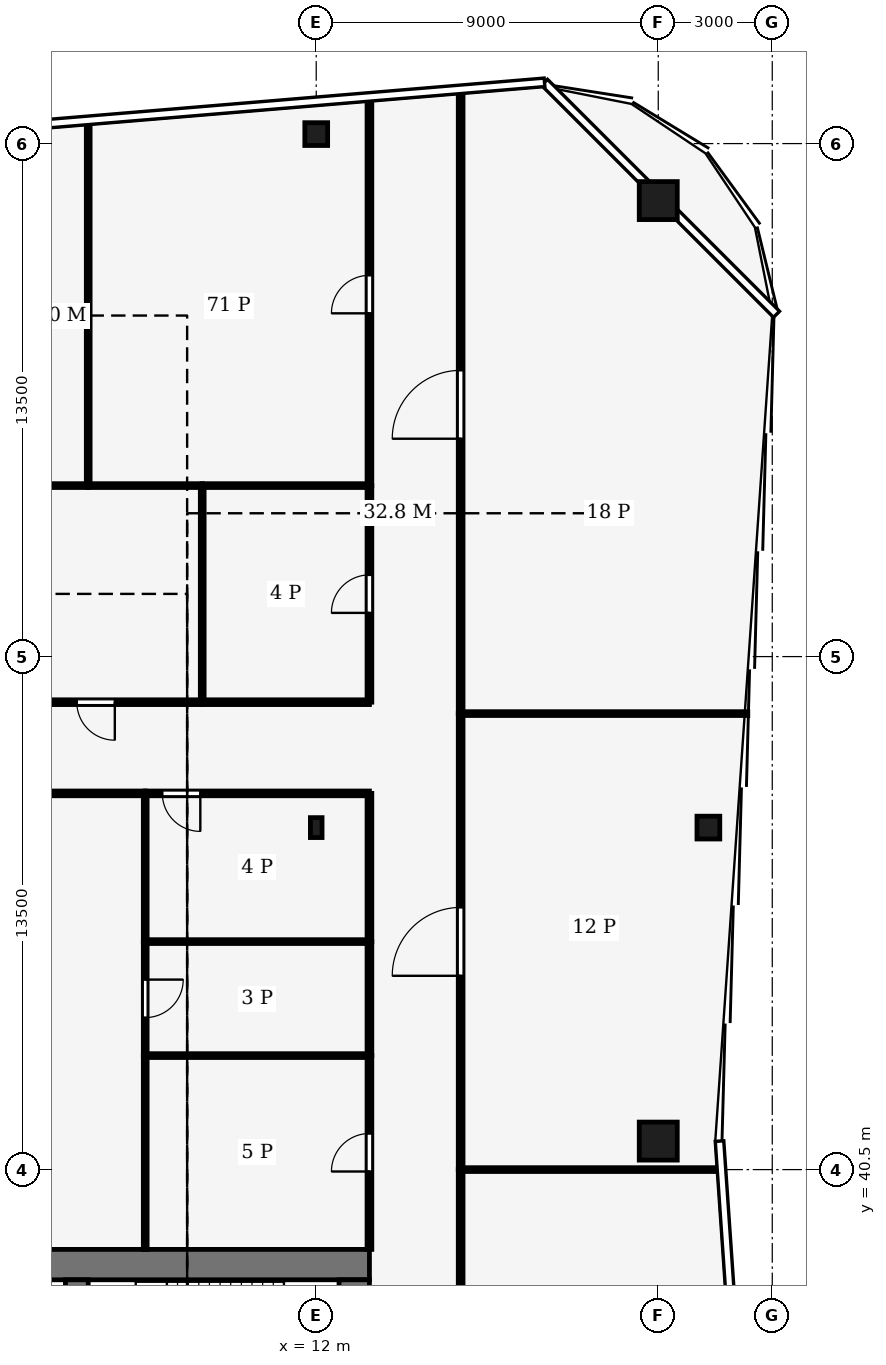
"""IFC4 building model, lengths in metres.
Left out: names, types, materials, properties, quantities, classifications, styles, units other than length and angle.
Written with IfcOpenShell. Run it as: python <this file> out.ifc"""

import sys

from ifc_helpers import new_model, si_unit, direction, frame, frame_2d, origin, origin_2d, place, context, subcontext, project, spatial, rectangle, hollow_rectangle, i_section, extrude, element, fill, save


model = new_model("IFC4")
c1 = context("Model", 3, precision=1e-05, world=origin(), true_north=direction((0.0, 1.0)))
c2 = subcontext(c1, "Body", "Model", "MODEL_VIEW")
j1 = project(units=[si_unit("LENGTHUNIT", "METRE"), si_unit("PLANEANGLEUNIT", "RADIAN")], contexts=[c1])
p1 = place(None, origin())
s1 = spatial("IfcSite", under=j1, at=p1, CompositionType="ELEMENT")
p2 = place(p1, origin())
s2 = spatial("IfcBuilding", under=s1, at=p2, CompositionType="ELEMENT")
p3 = place(p2, frame((0.0, 0.0, 258.0)))
s3 = spatial("IfcBuildingStorey", under=s2, at=p3, CompositionType="ELEMENT", Elevation=258.0)
p4 = place(p3, frame((-13.4, 38.0, -0.13), z_axis=(0.0, 0.0, 1.0), x_axis=(1.0, 0.0, 0.0)))
e1 = element("IfcWall", 1, at=p4, inside=s3, PredefinedType="SHEAR", context=c2, shape_type="SweptSolid", body=[
    extrude(rectangle(XDim=26.8, YDim=0.8, at=frame_2d((13.4, 0.0))), origin(), (0.0, 0.0, 1.0), 4.0),
])
p5 = place(p3, frame((13.0, 18.4, -0.13), z_axis=(0.0, 0.0, 1.0), x_axis=(0.0, 1.0, 0.0)))
e2 = element("IfcWall", 2, at=p5, inside=s3, PredefinedType="SHEAR", context=c2, shape_type="SweptSolid", body=[
    extrude(rectangle(XDim=19.2, YDim=0.8, at=frame_2d((9.6, 0.0))), origin(), (0.0, 0.0, 1.0), 4.0),
])
p6 = place(p5, frame((2.8, 0.0, 0.13)))
e3 = element("IfcOpeningElement", 3, at=p6, cuts=e2, PredefinedType="OPENING", context=c2, shape_type="SweptSolid", body=[
    extrude(rectangle(XDim=2.4, YDim=2.4, at=frame_2d((1.2, 1.2))), frame((0.0, 0.41, 0.0), z_axis=(0.0, -1.0, 0.0), x_axis=(1.0, 0.0, 0.0)), (0.0, 0.0, 1.0), 0.82),
])
p7 = place(p5, frame((13.3, 0.0, 0.13)))
e4 = element("IfcOpeningElement", 4, at=p7, cuts=e2, PredefinedType="OPENING", context=c2, shape_type="SweptSolid", body=[
    extrude(rectangle(XDim=2.4, YDim=2.4, at=frame_2d((1.2, 1.2))), frame((0.0, 0.41, 0.0), z_axis=(0.0, -1.0, 0.0), x_axis=(1.0, 0.0, 0.0)), (0.0, 0.0, 1.0), 0.82),
])
p8 = place(p3, frame((5.7, 18.4, -0.13), z_axis=(0.0, 0.0, 1.0), x_axis=(0.0, 1.0, 0.0)))
e5 = element("IfcWall", 5, at=p8, inside=s3, PredefinedType="SHEAR", context=c2, shape_type="SweptSolid", body=[
    extrude(rectangle(XDim=19.2, YDim=0.6, at=frame_2d((9.6, 0.0))), origin(), (0.0, 0.0, 1.0), 4.0),
])
p9 = place(p8, frame((8.35, 0.0, 0.13)))
e6 = element("IfcOpeningElement", 6, at=p9, cuts=e5, PredefinedType="OPENING", context=c2, shape_type="SweptSolid", body=[
    extrude(rectangle(XDim=0.9, YDim=2.1, at=frame_2d((0.45, 1.05))), frame((0.0, 0.31, 0.0), z_axis=(0.0, -1.0, 0.0), x_axis=(1.0, 0.0, 0.0)), (0.0, 0.0, 1.0), 0.62),
])
p10 = place(p8, frame((13.3, 0.0, 0.13)))
e7 = element("IfcOpeningElement", 7, at=p10, cuts=e5, PredefinedType="OPENING", context=c2, shape_type="SweptSolid", body=[
    extrude(rectangle(XDim=2.4, YDim=2.4, at=frame_2d((1.2, 1.2))), frame((0.0, 0.31, 0.0), z_axis=(0.0, -1.0, 0.0), x_axis=(1.0, 0.0, 0.0)), (0.0, 0.0, 1.0), 0.62),
])
for number, where, z_axis, x_axis in (
    (8, (21.0, 66.0, 0.0), (0.0, 0.0, 1.0), (1.0, 0.0, 0.0)),
    (9, (21.0, 41.25, 0.0), (0.0, 0.0, 1.0), (1.0, 0.0, 0.0)),
):
    element("IfcColumn", number, at=place(p3, frame(where, z_axis=z_axis, x_axis=x_axis)), inside=s3, PredefinedType="COLUMN", context=c2, shape_type="SweptSolid", body=[
        extrude(hollow_rectangle(XDim=1.0, YDim=1.0, WallThickness=0.045, at=origin_2d()), origin(), (0.0, 0.0, 1.0), 4.0),
    ])
for number, where, z_axis, x_axis in (
    (10, (12.0, 67.75, 0.0), (0.0, 0.0, 1.0), (1.0, 0.0, 0.0)),
    (11, (22.319, 49.5, 0.0), (0.0, 0.0, 1.0), (1.0, 0.0, 0.0)),
):
    element("IfcColumn", number, at=place(p3, frame(where, z_axis=z_axis, x_axis=x_axis)), inside=s3, PredefinedType="COLUMN", context=c2, shape_type="SweptSolid", body=[
        extrude(hollow_rectangle(XDim=0.6, YDim=0.6, WallThickness=0.025, at=origin_2d()), origin(), (0.0, 0.0, 1.0), 4.0),
    ])
p11 = place(p3, frame((12.0, 49.5, 0.0), z_axis=(0.0, 0.0, 1.0), x_axis=(1.0, 0.0, 0.0)))
e12 = element("IfcColumn", 12, at=p11, inside=s3, PredefinedType="COLUMN", context=c2, shape_type="SweptSolid", body=[
    extrude(i_section(OverallWidth=0.306, OverallDepth=0.524, WebThickness=0.012, FlangeThickness=0.04, FilletRadius=0.027, at=origin_2d()), origin(), (0.0, 0.0, 1.0), 4.0),
])
p12 = place(p3, frame((15.8, 40.5, 0.0), z_axis=(0.0, 0.0, 1.0), x_axis=(0.0, -1.0, 0.0)))
e13 = element("IfcWall", 13, at=p12, inside=s3, PredefinedType="PARTITIONING", context=c2, shape_type="SweptSolid", body=[
    extrude(rectangle(XDim=12.0, YDim=0.125, at=frame_2d((6.0, 0.0))), origin(), (0.0, 0.0, 1.0), 3.14),
])
p13 = place(p12, frame((5.5, 0.0, 0.0)))
e14 = element("IfcOpeningElement", 14, at=p13, cuts=e13, PredefinedType="OPENING", context=c2, shape_type="SweptSolid", body=[
    extrude(rectangle(XDim=1.0, YDim=2.1, at=frame_2d((0.5, 1.05))), frame((0.0, 0.073, 0.0), z_axis=(0.0, -1.0, 0.0), x_axis=(1.0, 0.0, 0.0)), (0.0, 0.0, 1.0), 0.145),
])
p14 = place(p3, frame((15.8, 40.5, 0.0), z_axis=(0.0, 0.0, 1.0), x_axis=(0.0, 1.0, 0.0)))
e15 = element("IfcWall", 15, at=p14, inside=s3, PredefinedType="PARTITIONING", context=c2, shape_type="SweptSolid", body=[
    extrude(rectangle(XDim=12.0, YDim=0.125, at=frame_2d((6.0, 0.0))), origin(), (0.0, 0.0, 1.0), 3.24),
])
p15 = place(p14, frame((5.1, 0.0, 0.0)))
e16 = element("IfcOpeningElement", 16, at=p15, cuts=e15, PredefinedType="OPENING", context=c2, shape_type="SweptSolid", body=[
    extrude(rectangle(XDim=1.8, YDim=2.1, at=frame_2d((0.9, 1.05))), frame((0.0, 0.073, 0.0), z_axis=(0.0, -1.0, 0.0), x_axis=(1.0, 0.0, 0.0)), (0.0, 0.0, 1.0), 0.145),
])
p16 = place(p3, frame((15.8, 52.5, 0.0), z_axis=(0.0, 0.0, 1.0), x_axis=(0.0, 1.0, 0.0)))
e17 = element("IfcWall", 17, at=p16, inside=s3, PredefinedType="PARTITIONING", context=c2, shape_type="SweptSolid", body=[
    extrude(rectangle(XDim=16.397, YDim=0.125, at=frame_2d((8.198, 0.0))), origin(), (0.0, 0.0, 1.0), 3.04),
])
p17 = place(p16, frame((7.233, 0.0, 0.0)))
e18 = element("IfcOpeningElement", 18, at=p17, cuts=e17, PredefinedType="OPENING", context=c2, shape_type="SweptSolid", body=[
    extrude(rectangle(XDim=1.8, YDim=2.1, at=frame_2d((0.9, 1.05))), frame((0.0, 0.073, 0.0), z_axis=(0.0, -1.0, 0.0), x_axis=(1.0, 0.0, 0.0)), (0.0, 0.0, 1.0), 0.145),
])
p18 = place(p3, frame((13.4, 38.4, 0.0), z_axis=(0.0, 0.0, 1.0), x_axis=(0.0, 1.0, 0.0)))
e19 = element("IfcWall", 19, at=p18, inside=s3, PredefinedType="PARTITIONING", context=c2, shape_type="SweptSolid", body=[
    extrude(rectangle(XDim=5.1, YDim=0.125, at=frame_2d((2.55, 0.0))), origin(), (0.0, 0.0, 1.0), 3.14),
])
p19 = place(p18, frame((2.05, 0.0, 0.0)))
e20 = element("IfcOpeningElement", 20, at=p19, cuts=e19, PredefinedType="OPENING", context=c2, shape_type="SweptSolid", body=[
    extrude(rectangle(XDim=1.0, YDim=2.1, at=frame_2d((0.5, 1.05))), frame((0.0, 0.073, 0.0), z_axis=(0.0, -1.0, 0.0), x_axis=(1.0, 0.0, 0.0)), (0.0, 0.0, 1.0), 0.145),
])
p20 = place(p3, frame((13.4, 43.5, 0.0), z_axis=(0.0, 0.0, 1.0), x_axis=(0.0, 1.0, 0.0)))
e21 = element("IfcWall", 21, at=p20, inside=s3, PredefinedType="PARTITIONING", context=c2, shape_type="SweptSolid", body=[
    extrude(rectangle(XDim=3.0, YDim=0.125, at=frame_2d((1.5, 0.0))), origin(), (0.0, 0.0, 1.0), 3.87),
])
p21 = place(p3, frame((13.4, 50.4, 0.0), z_axis=(0.0, 0.0, 1.0), x_axis=(-1.0, 0.0, 0.0)))
e22 = element("IfcWall", 22, at=p21, inside=s3, PredefinedType="PARTITIONING", context=c2, shape_type="SweptSolid", body=[
    extrude(rectangle(XDim=5.9, YDim=0.125, at=frame_2d((2.95, 0.0))), origin(), (0.0, 0.0, 1.0), 3.24),
])
p22 = place(p21, frame((4.45, 0.0, 0.0)))
e23 = element("IfcOpeningElement", 23, at=p22, cuts=e22, PredefinedType="OPENING", context=c2, shape_type="SweptSolid", body=[
    extrude(rectangle(XDim=1.0, YDim=2.1, at=frame_2d((0.5, 1.05))), frame((0.0, 0.073, 0.0), z_axis=(0.0, -1.0, 0.0), x_axis=(1.0, 0.0, 0.0)), (0.0, 0.0, 1.0), 0.145),
])
p23 = place(p3, frame((13.4, 46.5, 0.0), z_axis=(0.0, 0.0, 1.0), x_axis=(0.0, 1.0, 0.0)))
e24 = element("IfcWall", 24, at=p23, inside=s3, PredefinedType="PARTITIONING", context=c2, shape_type="SweptSolid", body=[
    extrude(rectangle(XDim=3.9, YDim=0.125, at=frame_2d((1.95, 0.0))), origin(), (0.0, 0.0, 1.0), 3.24),
])
p24 = place(p3, frame((7.5, 50.4, 0.0), z_axis=(0.0, 0.0, 1.0), x_axis=(-1.0, 0.0, 0.0)))
e25 = element("IfcWall", 25, at=p24, inside=s3, PredefinedType="PARTITIONING", context=c2, shape_type="SweptSolid", body=[
    extrude(rectangle(XDim=7.5, YDim=0.125, at=frame_2d((3.75, 0.0))), origin(), (0.0, 0.0, 1.0), 3.24),
])
p25 = place(p24, frame((2.85, 0.0, 0.0)))
e26 = element("IfcOpeningElement", 26, at=p25, cuts=e25, PredefinedType="OPENING", context=c2, shape_type="SweptSolid", body=[
    extrude(rectangle(XDim=1.0, YDim=2.1, at=frame_2d((0.5, 1.05))), frame((0.0, 0.073, 0.0), z_axis=(0.0, -1.0, 0.0), x_axis=(1.0, 0.0, 0.0)), (0.0, 0.0, 1.0), 0.145),
])
p26 = place(p3, frame((9.0, 52.8, 0.0), z_axis=(0.0, 0.0, 1.0), x_axis=(-1.0, 0.0, 0.0)))
e27 = element("IfcWall", 27, at=p26, inside=s3, PredefinedType="PARTITIONING", context=c2, shape_type="SweptSolid", body=[
    extrude(rectangle(XDim=12.0, YDim=0.125, at=frame_2d((6.0, 0.0))), origin(), (0.0, 0.0, 1.0), 3.24),
])
p27 = place(p26, frame((2.3, 0.0, 0.0)))
e28 = element("IfcOpeningElement", 28, at=p27, cuts=e27, PredefinedType="OPENING", context=c2, shape_type="SweptSolid", body=[
    extrude(rectangle(XDim=1.0, YDim=2.1, at=frame_2d((0.5, 1.05))), frame((0.0, 0.073, 0.0), z_axis=(0.0, -1.0, 0.0), x_axis=(1.0, 0.0, 0.0)), (0.0, 0.0, 1.0), 0.145),
])
p28 = place(p3, frame((13.4, 52.8, 0.0), z_axis=(0.0, 0.0, 1.0), x_axis=(0.0, 1.0, 0.0)))
e29 = element("IfcWall", 29, at=p28, inside=s3, PredefinedType="PARTITIONING", context=c2, shape_type="SweptSolid", body=[
    extrude(rectangle(XDim=5.7, YDim=0.125, at=frame_2d((2.85, 0.0))), origin(), (0.0, 0.0, 1.0), 3.87),
])
p29 = place(p28, frame((2.35, 0.0, 0.0)))
e30 = element("IfcOpeningElement", 30, at=p29, cuts=e29, PredefinedType="OPENING", context=c2, shape_type="SweptSolid", body=[
    extrude(rectangle(XDim=1.0, YDim=2.1, at=frame_2d((0.5, 1.05))), frame((0.0, 0.073, 0.0), z_axis=(0.0, -1.0, 0.0), x_axis=(1.0, 0.0, 0.0)), (0.0, 0.0, 1.0), 0.145),
])
p30 = place(p3, frame((13.4, 52.8, 0.0), z_axis=(0.0, 0.0, 1.0), x_axis=(-1.0, 0.0, 0.0)))
e31 = element("IfcWall", 31, at=p30, inside=s3, PredefinedType="PARTITIONING", context=c2, shape_type="SweptSolid", body=[
    extrude(rectangle(XDim=4.4, YDim=0.125, at=frame_2d((2.2, 0.0))), origin(), (0.0, 0.0, 1.0), 3.24),
])
p31 = place(p3, frame((13.4, 58.5, 0.0), z_axis=(0.0, 0.0, 1.0), x_axis=(0.0, 1.0, 0.0)))
e32 = element("IfcWall", 32, at=p31, inside=s3, PredefinedType="PARTITIONING", context=c2, shape_type="SweptSolid", body=[
    extrude(rectangle(XDim=10.197, YDim=0.125, at=frame_2d((5.098, 0.0))), origin(), (0.0, 0.0, 1.0), 3.04),
])
p32 = place(p31, frame((4.533, 0.0, 0.0)))
e33 = element("IfcOpeningElement", 33, at=p32, cuts=e32, PredefinedType="OPENING", context=c2, shape_type="SweptSolid", body=[
    extrude(rectangle(XDim=1.0, YDim=2.1, at=frame_2d((0.5, 1.05))), frame((0.0, 0.073, 0.0), z_axis=(0.0, -1.0, 0.0), x_axis=(1.0, 0.0, 0.0)), (0.0, 0.0, 1.0), 0.145),
])
p33 = place(p3, frame((22.632, 40.5, 0.0), z_axis=(0.0, 0.0, 1.0), x_axis=(-1.0, 0.0, 0.0)))
e34 = element("IfcWall", 34, at=p33, inside=s3, PredefinedType="PARTITIONING", context=c2, shape_type="SweptSolid", body=[
    extrude(rectangle(XDim=6.832, YDim=0.1, at=frame_2d((3.416, 0.0))), origin(), (0.0, 0.0, 1.0), 3.04),
])
p34 = place(p3, frame((23.356, 52.5, 0.0), z_axis=(0.0, 0.0, 1.0), x_axis=(-1.0, 0.0, 0.0)))
e35 = element("IfcWall", 35, at=p34, inside=s3, PredefinedType="PARTITIONING", context=c2, shape_type="SweptSolid", body=[
    extrude(rectangle(XDim=7.556, YDim=0.1, at=frame_2d((3.778, 0.0))), origin(), (0.0, 0.0, 1.0), 3.04),
])
p35 = place(p3, frame((13.4, 43.5, 0.0), z_axis=(0.0, 0.0, 1.0), x_axis=(-1.0, 0.0, 0.0)))
e36 = element("IfcWall", 36, at=p35, inside=s3, PredefinedType="PARTITIONING", context=c2, shape_type="SweptSolid", body=[
    extrude(rectangle(XDim=5.9, YDim=0.1, at=frame_2d((2.95, 0.0))), origin(), (0.0, 0.0, 1.0), 3.44),
])
p36 = place(p3, frame((7.5, 43.504, 0.0), z_axis=(0.0, 0.0, 1.0), x_axis=(0.0, -1.0, 0.0)))
e37 = element("IfcWall", 37, at=p36, inside=s3, PredefinedType="PARTITIONING", context=c2, shape_type="SweptSolid", body=[
    extrude(rectangle(XDim=5.104, YDim=0.1, at=frame_2d((2.552, 0.0))), origin(), (0.0, 0.0, 1.0), 3.87),
])
p37 = place(p3, frame((13.4, 46.5, 0.0), z_axis=(0.0, 0.0, 1.0), x_axis=(-1.0, 0.0, 0.0)))
e38 = element("IfcWall", 38, at=p37, inside=s3, PredefinedType="PARTITIONING", context=c2, shape_type="SweptSolid", body=[
    extrude(rectangle(XDim=5.9, YDim=0.1, at=frame_2d((2.95, 0.0))), origin(), (0.0, 0.0, 1.0), 3.44),
])
p38 = place(p3, frame((7.5, 46.504, 0.0), z_axis=(0.0, 0.0, 1.0), x_axis=(0.0, -1.0, 0.0)))
e39 = element("IfcWall", 39, at=p38, inside=s3, PredefinedType="PARTITIONING", context=c2, shape_type="SweptSolid", body=[
    extrude(rectangle(XDim=3.008, YDim=0.1, at=frame_2d((1.504, 0.0))), origin(), (0.0, 0.0, 1.0), 3.87),
])
p39 = place(p38, frame((1.004, 0.0, 0.0)))
e40 = element("IfcOpeningElement", 40, at=p39, cuts=e39, PredefinedType="OPENING", context=c2, shape_type="SweptSolid", body=[
    extrude(rectangle(XDim=1.0, YDim=2.1, at=frame_2d((0.5, 1.05))), frame((0.0, 0.06, 0.0), z_axis=(0.0, -1.0, 0.0), x_axis=(1.0, 0.0, 0.0)), (0.0, 0.0, 1.0), 0.12),
])
p40 = place(p3, frame((7.5, 50.4, 0.0), z_axis=(0.0, 0.0, 1.0), x_axis=(0.0, -1.0, 0.0)))
e41 = element("IfcWall", 41, at=p40, inside=s3, PredefinedType="PARTITIONING", context=c2, shape_type="SweptSolid", body=[
    extrude(rectangle(XDim=3.904, YDim=0.1, at=frame_2d((1.952, 0.0))), origin(), (0.0, 0.0, 1.0), 3.24),
])
p41 = place(p3, frame((9.0, 52.8, 0.0), z_axis=(0.0, 0.0, 1.0), x_axis=(0.0, 1.0, 0.0)))
e42 = element("IfcWall", 42, at=p41, inside=s3, PredefinedType="PARTITIONING", context=c2, shape_type="SweptSolid", body=[
    extrude(rectangle(XDim=5.7, YDim=0.1, at=frame_2d((2.85, 0.0))), origin(), (0.0, 0.0, 1.0), 3.87),
])
p42 = place(p3, frame((-3.0, 58.5, 0.0), z_axis=(0.0, 0.0, 1.0), x_axis=(1.0, 0.0, 0.0)))
e43 = element("IfcWall", 43, at=p42, inside=s3, PredefinedType="PARTITIONING", context=c2, shape_type="SweptSolid", body=[
    extrude(rectangle(XDim=9.0, YDim=0.1, at=frame_2d((4.5, 0.0))), origin(), (0.0, 0.0, 1.0), 3.24),
])
p43 = place(p42, frame((4.0, 0.0, 0.0)))
e44 = element("IfcOpeningElement", 44, at=p43, cuts=e43, PredefinedType="OPENING", context=c2, shape_type="SweptSolid", body=[
    extrude(rectangle(XDim=1.0, YDim=2.1, at=frame_2d((0.5, 1.05))), frame((0.0, 0.06, 0.0), z_axis=(0.0, -1.0, 0.0), x_axis=(1.0, 0.0, 0.0)), (0.0, 0.0, 1.0), 0.12),
])
p44 = place(p3, frame((9.004, 58.5, 0.0), z_axis=(0.0, 0.0, 1.0), x_axis=(-1.0, 0.0, 0.0)))
e45 = element("IfcWall", 45, at=p44, inside=s3, PredefinedType="PARTITIONING", context=c2, shape_type="SweptSolid", body=[
    extrude(rectangle(XDim=3.004, YDim=0.1, at=frame_2d((1.502, 0.0))), origin(), (0.0, 0.0, 1.0), 3.24),
])
p45 = place(p3, frame((13.4, 58.5, 0.0), z_axis=(0.0, 0.0, 1.0), x_axis=(-1.0, 0.0, 0.0)))
e46 = element("IfcWall", 46, at=p45, inside=s3, PredefinedType="PARTITIONING", context=c2, shape_type="SweptSolid", body=[
    extrude(rectangle(XDim=4.404, YDim=0.1, at=frame_2d((2.202, 0.0))), origin(), (0.0, 0.0, 1.0), 3.24),
])
p46 = place(p3, frame((6.0, 58.5, 0.0), z_axis=(0.0, 0.0, 1.0), x_axis=(0.0, 1.0, 0.0)))
e47 = element("IfcWall", 47, at=p46, inside=s3, PredefinedType="PARTITIONING", context=c2, shape_type="SweptSolid", body=[
    extrude(rectangle(XDim=9.58, YDim=0.1, at=frame_2d((4.79, 0.0))), origin(), (0.0, 0.0, 1.0), 3.04),
])
p47 = place(p15, origin())
e48 = element("IfcDoor", 48, at=p47, inside=s3, OperationType="DOUBLE_DOOR_SINGLE_SWING", PredefinedType="DOOR", context=c2, shape_type="SweptSolid", body=[
    extrude(rectangle(XDim=1.8, YDim=2.1, at=frame_2d((0.9, 1.05))), frame((0.0, 0.025, 0.0), z_axis=(0.0, -1.0, 0.0), x_axis=(1.0, 0.0, 0.0)), (0.0, 0.0, 1.0), 0.05),
])
fill(e16, e48)
p48 = place(p17, origin())
e49 = element("IfcDoor", 49, at=p48, inside=s3, OperationType="DOUBLE_DOOR_SINGLE_SWING", PredefinedType="DOOR", context=c2, shape_type="SweptSolid", body=[
    extrude(rectangle(XDim=1.8, YDim=2.1, at=frame_2d((0.9, 1.05))), frame((0.0, 0.025, 0.0), z_axis=(0.0, -1.0, 0.0), x_axis=(1.0, 0.0, 0.0)), (0.0, 0.0, 1.0), 0.05),
])
fill(e18, e49)
p49 = place(p19, origin())
e50 = element("IfcDoor", 50, at=p49, inside=s3, OperationType="SINGLE_SWING_LEFT", PredefinedType="DOOR", context=c2, shape_type="SweptSolid", body=[
    extrude(rectangle(XDim=1.0, YDim=2.1, at=frame_2d((0.5, 1.05))), frame((0.0, 0.025, 0.0), z_axis=(0.0, -1.0, 0.0), x_axis=(1.0, 0.0, 0.0)), (0.0, 0.0, 1.0), 0.05),
])
fill(e20, e50)
p50 = place(p22, origin())
e51 = element("IfcDoor", 51, at=p50, inside=s3, OperationType="SINGLE_SWING_RIGHT", PredefinedType="DOOR", context=c2, shape_type="SweptSolid", body=[
    extrude(rectangle(XDim=1.0, YDim=2.1, at=frame_2d((0.5, 1.05))), frame((0.0, 0.025, 0.0), z_axis=(0.0, -1.0, 0.0), x_axis=(1.0, 0.0, 0.0)), (0.0, 0.0, 1.0), 0.05),
])
fill(e23, e51)
p51 = place(p27, origin())
e52 = element("IfcDoor", 52, at=p51, inside=s3, OperationType="SINGLE_SWING_LEFT", PredefinedType="DOOR", context=c2, shape_type="SweptSolid", body=[
    extrude(rectangle(XDim=1.0, YDim=2.1, at=frame_2d((0.5, 1.05))), frame((0.0, 0.025, 0.0), z_axis=(0.0, -1.0, 0.0), x_axis=(1.0, 0.0, 0.0)), (0.0, 0.0, 1.0), 0.05),
])
fill(e28, e52)
p52 = place(p29, origin())
e53 = element("IfcDoor", 53, at=p52, inside=s3, OperationType="SINGLE_SWING_RIGHT", PredefinedType="DOOR", context=c2, shape_type="SweptSolid", body=[
    extrude(rectangle(XDim=1.0, YDim=2.1, at=frame_2d((0.5, 1.05))), frame((0.0, 0.025, 0.0), z_axis=(0.0, -1.0, 0.0), x_axis=(1.0, 0.0, 0.0)), (0.0, 0.0, 1.0), 0.05),
])
fill(e30, e53)
p53 = place(p32, origin())
e54 = element("IfcDoor", 54, at=p53, inside=s3, OperationType="SINGLE_SWING_LEFT", PredefinedType="DOOR", context=c2, shape_type="SweptSolid", body=[
    extrude(rectangle(XDim=1.0, YDim=2.1, at=frame_2d((0.5, 1.05))), frame((0.0, 0.025, 0.0), z_axis=(0.0, -1.0, 0.0), x_axis=(1.0, 0.0, 0.0)), (0.0, 0.0, 1.0), 0.05),
])
fill(e33, e54)
p54 = place(p39, origin())
e55 = element("IfcDoor", 55, at=p54, inside=s3, OperationType="SINGLE_SWING_LEFT", PredefinedType="DOOR", context=c2, shape_type="SweptSolid", body=[
    extrude(rectangle(XDim=1.0, YDim=2.1, at=frame_2d((0.5, 1.05))), frame((0.0, 0.025, 0.0), z_axis=(0.0, -1.0, 0.0), x_axis=(1.0, 0.0, 0.0)), (0.0, 0.0, 1.0), 0.05),
])
fill(e40, e55)
save(model, sys.argv[1])
